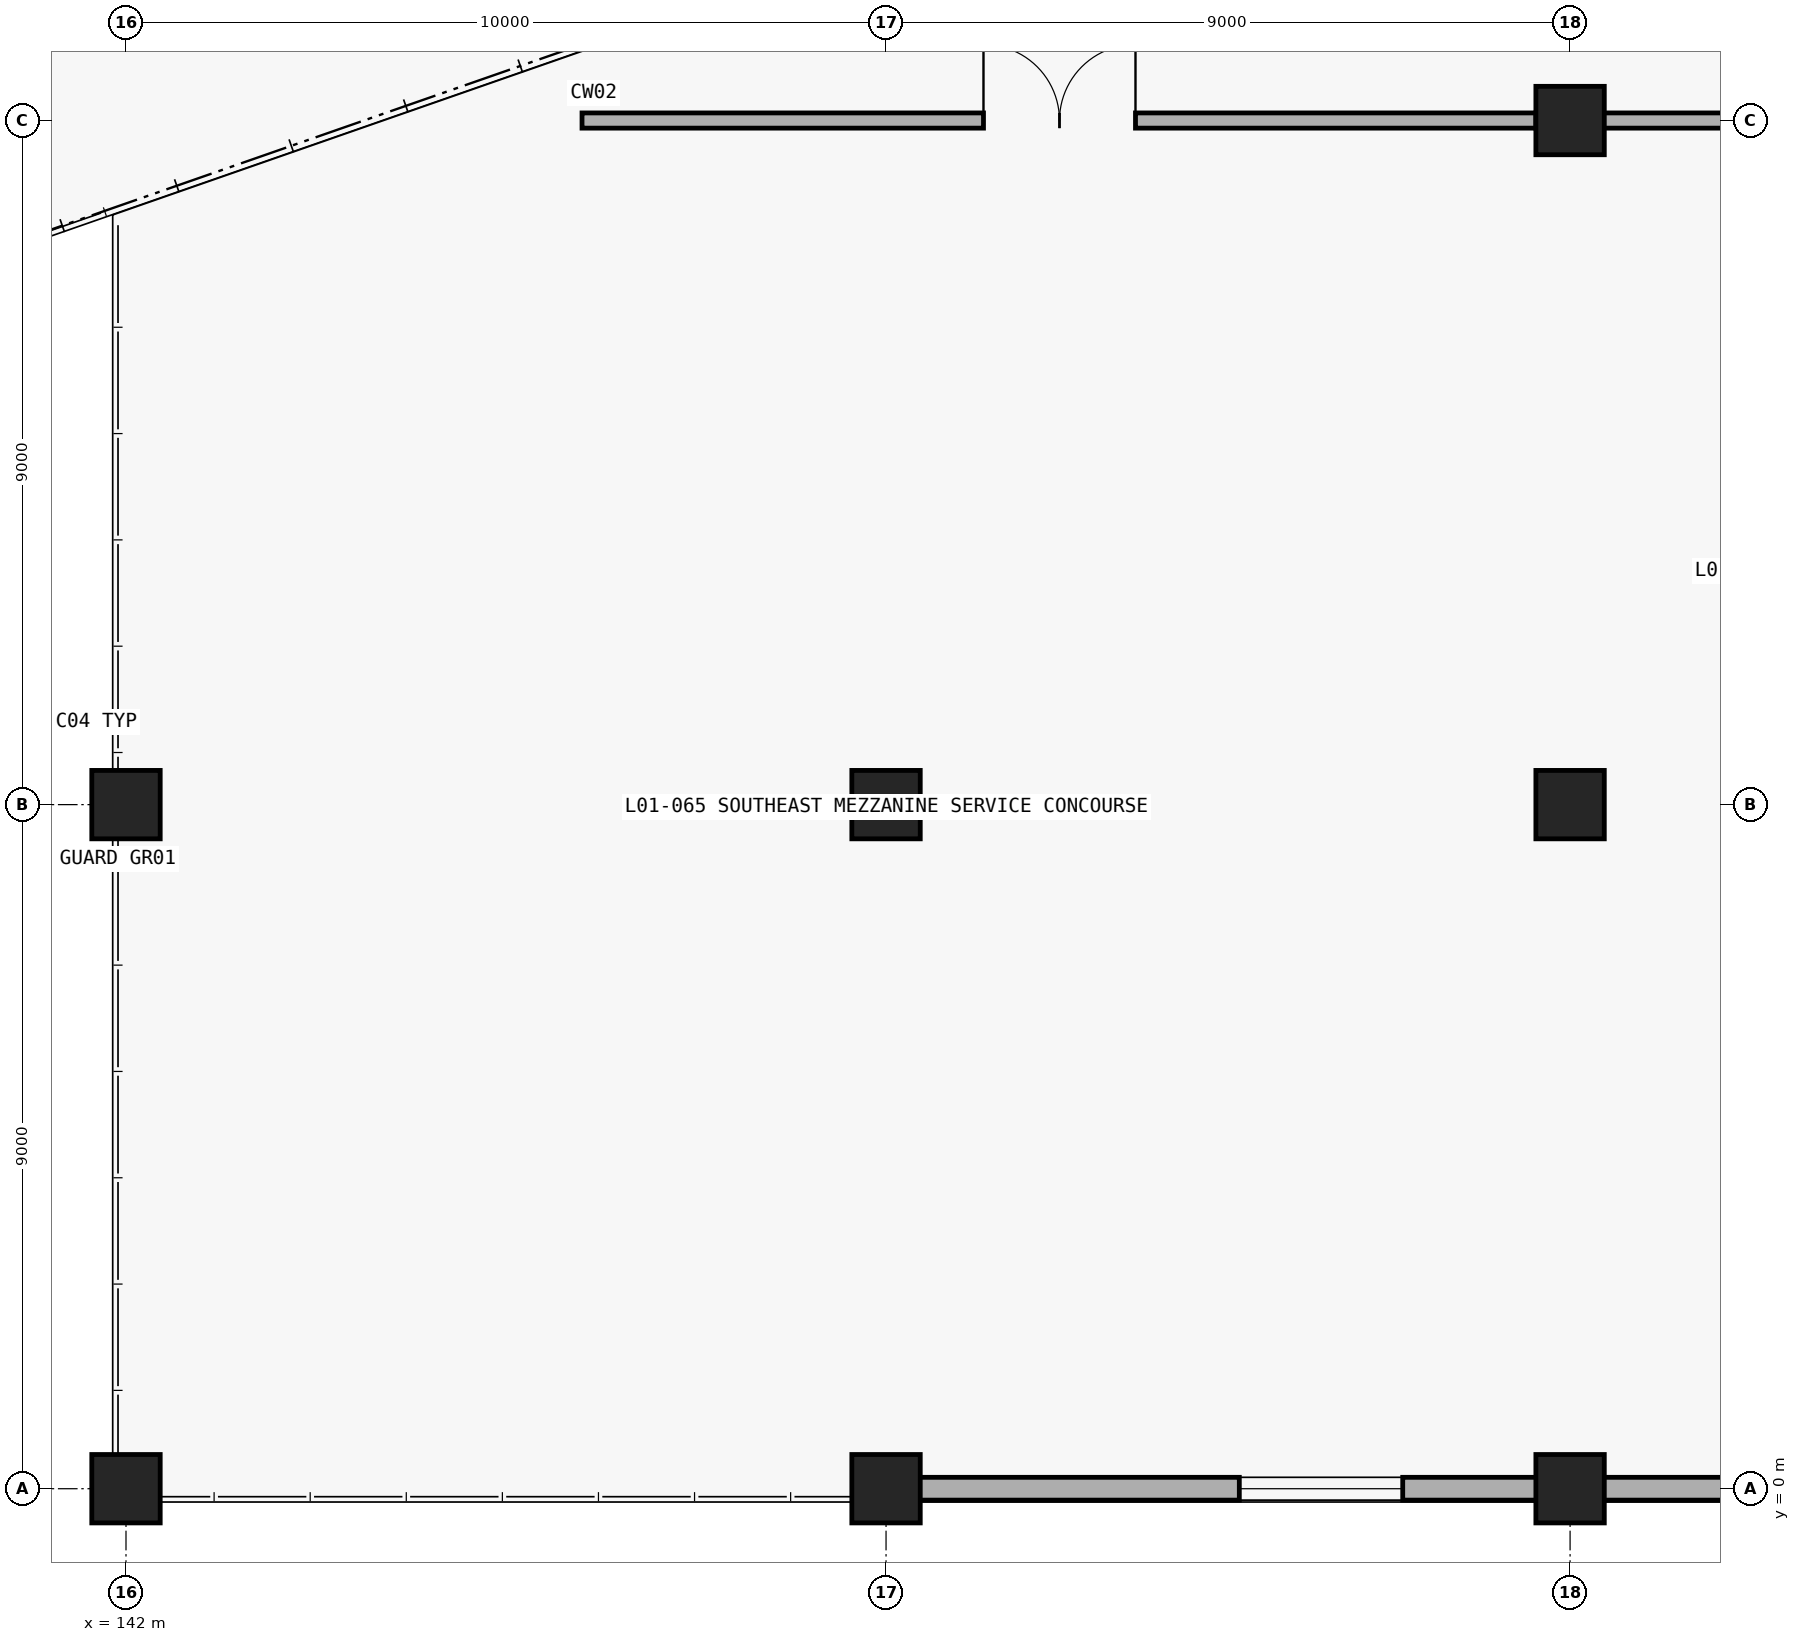
"""IFC4 building model, lengths in metres.
Left out: names, types, materials, properties, quantities, classifications, styles, units other than length and angle.
Written with IfcOpenShell. Run it as: python <this file> out.ifc"""

import sys

from ifc_helpers import new_model, si_unit, direction, frame, frame_2d, origin, origin_2d, place, context, subcontext, project, spatial, rectangle, extrude, element, fill, save


model = new_model("IFC4")
c1 = context("Model", 3, precision=1e-05, world=origin(), true_north=direction((0.0, 1.0)))
c2 = subcontext(c1, "Body", "Model", "MODEL_VIEW")
j1 = project(units=[si_unit("LENGTHUNIT", "METRE"), si_unit("PLANEANGLEUNIT", "RADIAN")], contexts=[c1])
p1 = place(None, origin())
s1 = spatial("IfcSite", under=j1, at=p1, CompositionType="ELEMENT")
p2 = place(p1, origin())
s2 = spatial("IfcBuilding", under=s1, at=p2, CompositionType="ELEMENT")
p3 = place(p2, frame((0.0, 0.0, 5.4)))
s3 = spatial("IfcBuildingStorey", under=s2, at=p3, CompositionType="ELEMENT", Elevation=5.4)
for number, where, z_axis, x_axis in (
    (1, (142.0, 0.0, 0.0), (0.0, 0.0, 1.0), (1.0, 0.0, 0.0)),
    (2, (142.0, 9.0, 0.0), (0.0, 0.0, 1.0), (1.0, 0.0, 0.0)),
    (3, (152.0, 0.0, 0.0), (0.0, 0.0, 1.0), (1.0, 0.0, 0.0)),
    (4, (152.0, 9.0, 0.0), (0.0, 0.0, 1.0), (1.0, 0.0, 0.0)),
    (5, (161.0, 0.0, 0.0), (0.0, 0.0, 1.0), (1.0, 0.0, 0.0)),
    (6, (161.0, 9.0, 0.0), (0.0, 0.0, 1.0), (1.0, 0.0, 0.0)),
    (7, (161.0, 18.0, 0.0), (0.0, 0.0, 1.0), (1.0, 0.0, 0.0)),
):
    element("IfcColumn", number, at=place(p3, frame(where, z_axis=z_axis, x_axis=x_axis)), inside=s3, PredefinedType="COLUMN", context=c2, shape_type="SweptSolid", body=[
        extrude(rectangle(XDim=0.9, YDim=0.9, at=origin_2d()), origin(), (0.0, 0.0, 1.0), 4.8),
    ])
p4 = place(p3, frame((169.575, 0.0, 0.0), z_axis=(0.0, 0.0, 1.0), x_axis=(-1.0, 0.0, 0.0)))
e8 = element("IfcWall", 8, at=p4, inside=s3, PredefinedType="STANDARD", context=c2, shape_type="SweptSolid", body=[
    extrude(rectangle(XDim=8.15, YDim=0.3, at=frame_2d((4.075, 0.0))), origin(), (0.0, 0.0, 1.0), 3.804),
])
p5 = place(p4, frame((1.927, 0.0, 0.95)))
e9 = element("IfcOpeningElement", 9, at=p5, cuts=e8, PredefinedType="OPENING", context=c2, shape_type="SweptSolid", body=[
    extrude(rectangle(XDim=1.85, YDim=2.15, at=frame_2d((0.925, 1.075))), frame((0.0, 0.16, 0.0), z_axis=(0.0, -1.0, 0.0), x_axis=(1.0, 0.0, 0.0)), (0.0, 0.0, 1.0), 0.32),
])
p6 = place(p3, frame((160.575, 0.0, 0.0), z_axis=(0.0, 0.0, 1.0), x_axis=(-1.0, 0.0, 0.0)))
e10 = element("IfcWall", 10, at=p6, inside=s3, PredefinedType="STANDARD", context=c2, shape_type="SweptSolid", body=[
    extrude(rectangle(XDim=8.15, YDim=0.3, at=frame_2d((4.075, 0.0))), origin(), (0.0, 0.0, 1.0), 3.804),
])
p7 = place(p6, frame((1.777, 0.0, 0.95)))
e11 = element("IfcOpeningElement", 11, at=p7, cuts=e10, PredefinedType="OPENING", context=c2, shape_type="SweptSolid", body=[
    extrude(rectangle(XDim=2.15, YDim=2.25, at=frame_2d((1.075, 1.125))), frame((0.0, 0.16, 0.0), z_axis=(0.0, -1.0, 0.0), x_axis=(1.0, 0.0, 0.0)), (0.0, 0.0, 1.0), 0.32),
])
p8 = place(p3, frame((148.0, 18.0, 0.0), z_axis=(0.0, 0.0, 1.0), x_axis=(1.0, 0.0, 0.0)))
e12 = element("IfcWall", 12, at=p8, inside=s3, PredefinedType="PARTITIONING", context=c2, shape_type="SweptSolid", body=[
    extrude(rectangle(XDim=12.565, YDim=0.2, at=frame_2d((6.282, 0.0))), origin(), (0.0, 0.0, 1.0), 4.5),
])
p9 = place(p8, frame((5.282, 0.0, 0.0)))
e13 = element("IfcOpeningElement", 13, at=p9, cuts=e12, PredefinedType="OPENING", context=c2, shape_type="SweptSolid", body=[
    extrude(rectangle(XDim=2.0, YDim=2.3, at=frame_2d((1.0, 1.15))), frame((0.0, 0.11, 0.0), z_axis=(0.0, -1.0, 0.0), x_axis=(1.0, 0.0, 0.0)), (0.0, 0.0, 1.0), 0.22),
])
p10 = place(p3, frame((160.55, 18.0, 0.0), z_axis=(0.0, 0.0, 1.0), x_axis=(1.0, 0.0, 0.0)))
e14 = element("IfcWall", 14, at=p10, inside=s3, PredefinedType="PARTITIONING", context=c2, shape_type="SweptSolid", body=[
    extrude(rectangle(XDim=9.015, YDim=0.2, at=frame_2d((4.507, 0.0))), origin(), (0.0, 0.0, 1.0), 3.804),
])
p11 = place(p10, frame((3.457, 0.0, 0.0)))
e15 = element("IfcOpeningElement", 15, at=p11, cuts=e14, PredefinedType="OPENING", context=c2, shape_type="SweptSolid", body=[
    extrude(rectangle(XDim=2.1, YDim=2.35, at=frame_2d((1.05, 1.175))), frame((0.0, 0.11, 0.0), z_axis=(0.0, -1.0, 0.0), x_axis=(1.0, 0.0, 0.0)), (0.0, 0.0, 1.0), 0.22),
])
p12 = place(p7, origin())
e16 = element("IfcWindow", 16, at=p12, inside=s3, PartitioningType="SINGLE_PANEL", PredefinedType="WINDOW", context=c2, shape_type="SweptSolid", body=[
    extrude(rectangle(XDim=2.15, YDim=2.25, at=frame_2d((1.075, 1.125))), frame((0.0, 0.03, 0.0), z_axis=(0.0, -1.0, 0.0), x_axis=(1.0, 0.0, 0.0)), (0.0, 0.0, 1.0), 0.06),
])
fill(e11, e16)
p13 = place(p9, origin())
e17 = element("IfcDoor", 17, at=p13, inside=s3, OperationType="DOUBLE_DOOR_SINGLE_SWING", PredefinedType="DOOR", context=c2, shape_type="SweptSolid", body=[
    extrude(rectangle(XDim=2.0, YDim=2.3, at=frame_2d((1.0, 1.15))), frame((0.0, 0.025, 0.0), z_axis=(0.0, -1.0, 0.0), x_axis=(1.0, 0.0, 0.0)), (0.0, 0.0, 1.0), 0.05),
])
fill(e13, e17)
save(model, sys.argv[1])
